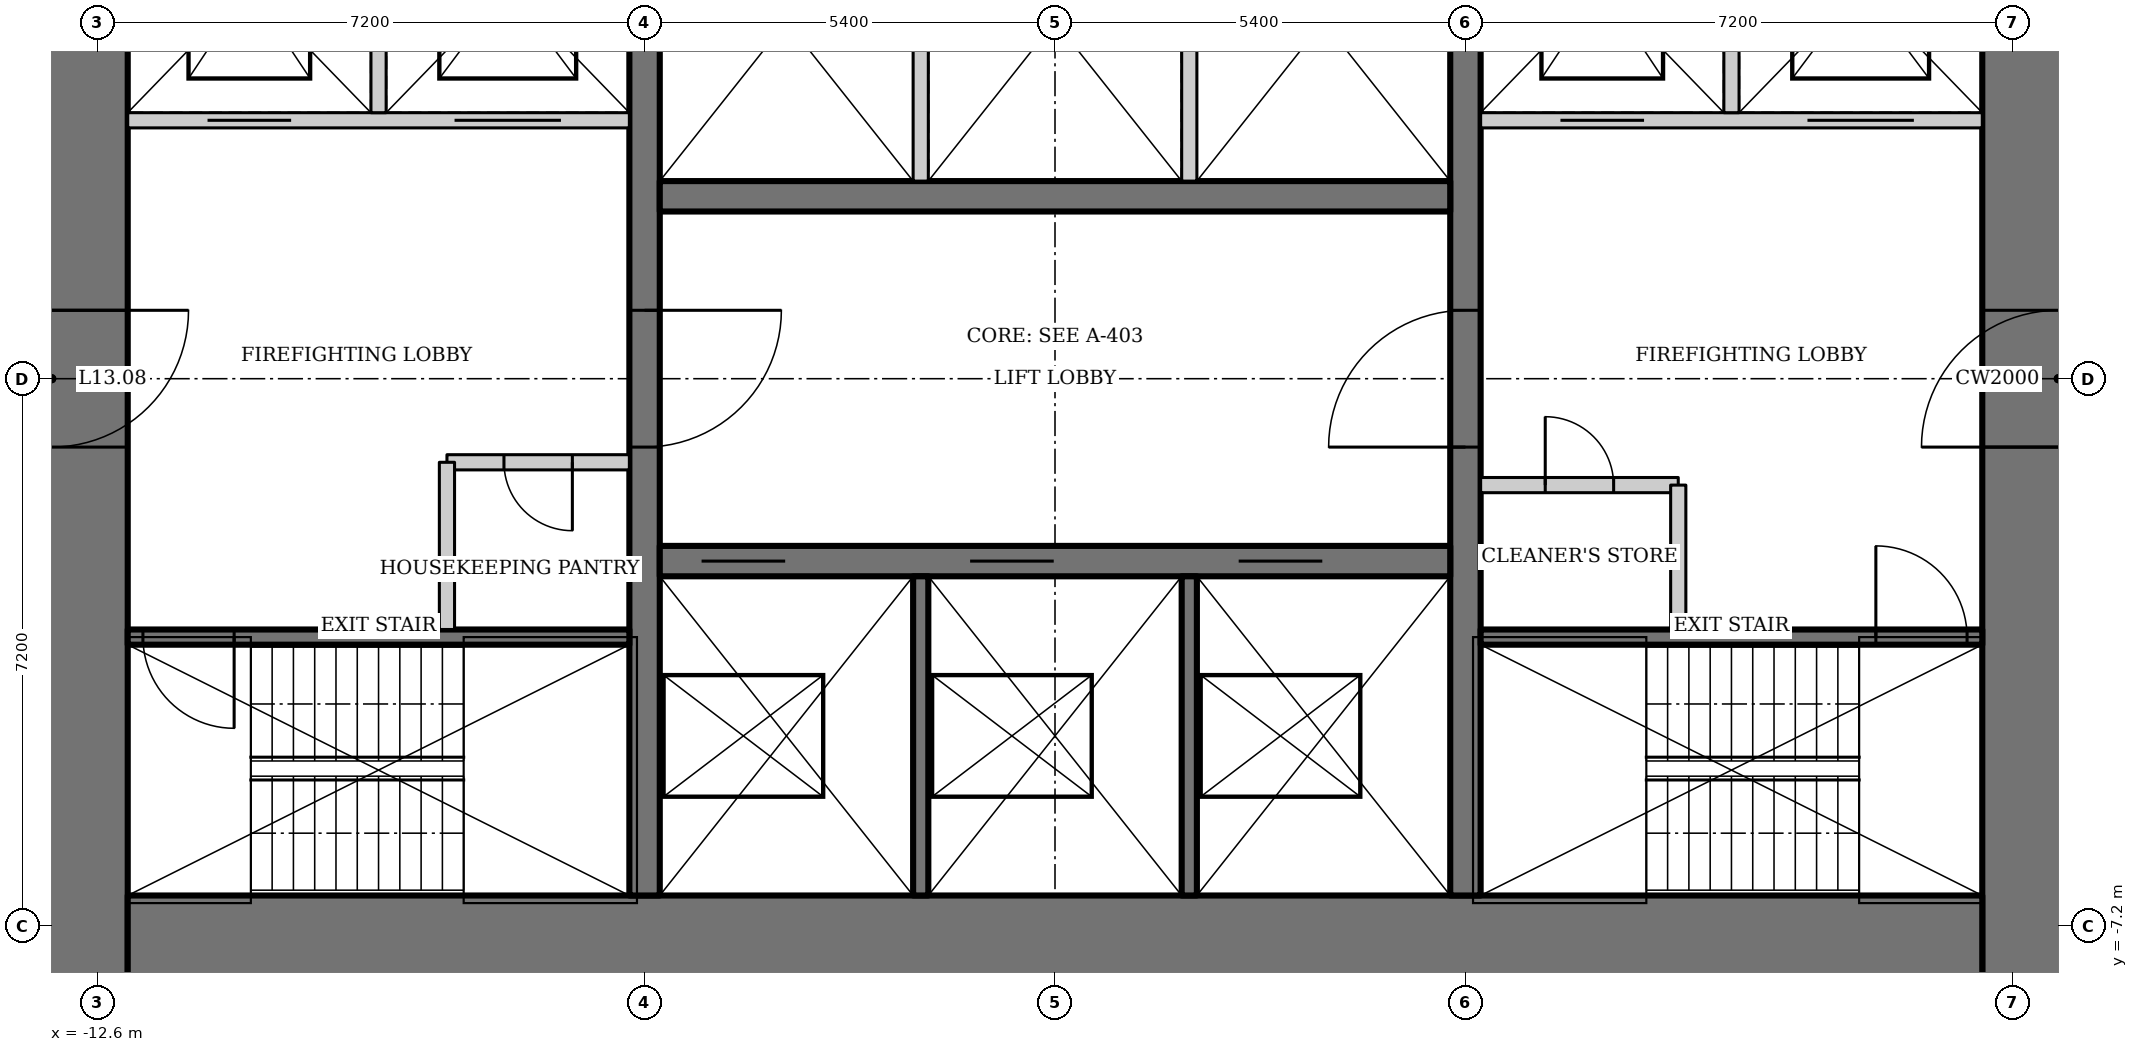
"""IFC4 building model, lengths in metres.
Left out: names, types, materials, properties, quantities, classifications, styles, units other than length and angle.
Written with IfcOpenShell. Run it as: python <this file> out.ifc"""

import sys

from ifc_helpers import new_model, si_unit, direction, frame, frame_2d, origin, place, context, subcontext, project, spatial, rectangle, extrude, element, fill, save


model = new_model("IFC4")
c1 = context("Model", 3, precision=1e-05, world=origin(), true_north=direction((0.0, 1.0)))
c2 = subcontext(c1, "Body", "Model", "MODEL_VIEW")
j1 = project(units=[si_unit("LENGTHUNIT", "METRE"), si_unit("PLANEANGLEUNIT", "RADIAN")], contexts=[c1])
p1 = place(None, origin())
s1 = spatial("IfcSite", under=j1, at=p1, CompositionType="ELEMENT")
p2 = place(p1, origin())
s2 = spatial("IfcBuilding", under=s1, at=p2, CompositionType="ELEMENT")
p3 = place(p2, frame((0.0, 0.0, 62.2)))
s3 = spatial("IfcBuildingStorey", under=s2, at=p3, CompositionType="ELEMENT", Elevation=62.2)
p4 = place(p3, frame((13.2, -13.0, 0.0), z_axis=(0.0, 0.0, 1.0), x_axis=(0.0, 1.0, 0.0)))
e1 = element("IfcWall", 1, at=p4, inside=s3, PredefinedType="SHEAR", context=c2, shape_type="SweptSolid", body=[
    extrude(rectangle(XDim=26.0, YDim=2.0, at=frame_2d((13.0, 0.0))), origin(), (0.0, 0.0, 1.0), 3.6),
])
p5 = place(p4, frame((12.1, 0.0, 0.0)))
e2 = element("IfcOpeningElement", 2, at=p5, cuts=e1, PredefinedType="OPENING", context=c2, shape_type="SweptSolid", body=[
    extrude(rectangle(XDim=1.8, YDim=2.1, at=frame_2d((0.9, 1.05))), frame((0.0, 1.01, 0.0), z_axis=(0.0, -1.0, 0.0), x_axis=(1.0, 0.0, 0.0)), (0.0, 0.0, 1.0), 2.02),
])
p6 = place(p3, frame((-13.2, 13.0, 0.0), z_axis=(0.0, 0.0, 1.0), x_axis=(0.0, -1.0, 0.0)))
e3 = element("IfcWall", 3, at=p6, inside=s3, PredefinedType="SHEAR", context=c2, shape_type="SweptSolid", body=[
    extrude(rectangle(XDim=26.0, YDim=2.0, at=frame_2d((13.0, 0.0))), origin(), (0.0, 0.0, 1.0), 3.6),
])
p7 = place(p6, frame((12.1, 0.0, 0.0)))
e4 = element("IfcOpeningElement", 4, at=p7, cuts=e3, PredefinedType="OPENING", context=c2, shape_type="SweptSolid", body=[
    extrude(rectangle(XDim=1.8, YDim=2.1, at=frame_2d((0.9, 1.05))), frame((0.0, 1.01, 0.0), z_axis=(0.0, -1.0, 0.0), x_axis=(1.0, 0.0, 0.0)), (0.0, 0.0, 1.0), 2.02),
])
p8 = place(p3, frame((-12.2, -8.0, 0.0), z_axis=(0.0, 0.0, 1.0), x_axis=(1.0, 0.0, 0.0)))
e5 = element("IfcWall", 5, at=p8, inside=s3, PredefinedType="SHEAR", context=c2, shape_type="SweptSolid", body=[
    extrude(rectangle(XDim=24.4, YDim=2.4, at=frame_2d((12.2, 0.0))), origin(), (0.0, 0.0, 1.0), 3.6),
])
p9 = place(p3, frame((5.4, -6.8, 0.0), z_axis=(0.0, 0.0, 1.0), x_axis=(0.0, 1.0, 0.0)))
e6 = element("IfcWall", 6, at=p9, inside=s3, PredefinedType="SHEAR", context=c2, shape_type="SweptSolid", body=[
    extrude(rectangle(XDim=13.6, YDim=0.4, at=frame_2d((6.8, 0.0))), origin(), (0.0, 0.0, 1.0), 3.6),
])
p10 = place(p9, frame((5.9, 0.0, 0.0)))
e7 = element("IfcOpeningElement", 7, at=p10, cuts=e6, PredefinedType="OPENING", context=c2, shape_type="SweptSolid", body=[
    extrude(rectangle(XDim=1.8, YDim=2.1, at=frame_2d((0.9, 1.05))), frame((0.0, 0.21, 0.0), z_axis=(0.0, -1.0, 0.0), x_axis=(1.0, 0.0, 0.0)), (0.0, 0.0, 1.0), 0.42),
])
p11 = place(p3, frame((-5.4, 6.8, 0.0), z_axis=(0.0, 0.0, 1.0), x_axis=(0.0, -1.0, 0.0)))
e8 = element("IfcWall", 8, at=p11, inside=s3, PredefinedType="SHEAR", context=c2, shape_type="SweptSolid", body=[
    extrude(rectangle(XDim=13.6, YDim=0.4, at=frame_2d((6.8, 0.0))), origin(), (0.0, 0.0, 1.0), 3.6),
])
p12 = place(p11, frame((5.9, 0.0, 0.0)))
e9 = element("IfcOpeningElement", 9, at=p12, cuts=e8, PredefinedType="OPENING", context=c2, shape_type="SweptSolid", body=[
    extrude(rectangle(XDim=1.8, YDim=2.1, at=frame_2d((0.9, 1.05))), frame((0.0, 0.21, 0.0), z_axis=(0.0, -1.0, 0.0), x_axis=(1.0, 0.0, 0.0)), (0.0, 0.0, 1.0), 0.42),
])
p13 = place(p3, frame((-5.2, -2.4, 0.0), z_axis=(0.0, 0.0, 1.0), x_axis=(1.0, 0.0, 0.0)))
e10 = element("IfcWall", 10, at=p13, inside=s3, PredefinedType="SHEAR", context=c2, shape_type="SweptSolid", body=[
    extrude(rectangle(XDim=10.4, YDim=0.4, at=frame_2d((5.2, 0.0))), origin(), (0.0, 0.0, 1.0), 3.6),
])
p14 = place(p13, frame((0.55, 0.0, 0.0)))
e11 = element("IfcOpeningElement", 11, at=p14, cuts=e10, PredefinedType="OPENING", context=c2, shape_type="SweptSolid", body=[
    extrude(rectangle(XDim=1.1, YDim=2.2, at=frame_2d((0.55, 1.1))), frame((0.0, 0.21, 0.0), z_axis=(0.0, -1.0, 0.0), x_axis=(1.0, 0.0, 0.0)), (0.0, 0.0, 1.0), 0.42),
])
p15 = place(p13, frame((4.083, 0.0, 0.0)))
e12 = element("IfcOpeningElement", 12, at=p15, cuts=e10, PredefinedType="OPENING", context=c2, shape_type="SweptSolid", body=[
    extrude(rectangle(XDim=1.1, YDim=2.2, at=frame_2d((0.55, 1.1))), frame((0.0, 0.21, 0.0), z_axis=(0.0, -1.0, 0.0), x_axis=(1.0, 0.0, 0.0)), (0.0, 0.0, 1.0), 0.42),
])
p16 = place(p13, frame((7.617, 0.0, 0.0)))
e13 = element("IfcOpeningElement", 13, at=p16, cuts=e10, PredefinedType="OPENING", context=c2, shape_type="SweptSolid", body=[
    extrude(rectangle(XDim=1.1, YDim=2.2, at=frame_2d((0.55, 1.1))), frame((0.0, 0.21, 0.0), z_axis=(0.0, -1.0, 0.0), x_axis=(1.0, 0.0, 0.0)), (0.0, 0.0, 1.0), 0.42),
])
for number, where, z_axis, x_axis in (
    (14, (-1.767, -2.6, 0.0), (0.0, 0.0, 1.0), (0.0, -1.0, 0.0)),
    (15, (1.767, -2.6, 0.0), (0.0, 0.0, 1.0), (0.0, -1.0, 0.0)),
):
    element("IfcWall", number, at=place(p3, frame(where, z_axis=z_axis, x_axis=x_axis)), inside=s3, PredefinedType="SOLIDWALL", context=c2, shape_type="SweptSolid", body=[
        extrude(rectangle(XDim=4.2, YDim=0.2, at=frame_2d((2.1, 0.0))), origin(), (0.0, 0.0, 1.0), 3.6),
    ])
p17 = place(p3, frame((5.2, 2.4, 0.0), z_axis=(0.0, 0.0, 1.0), x_axis=(-1.0, 0.0, 0.0)))
e16 = element("IfcWall", 16, at=p17, inside=s3, PredefinedType="SHEAR", context=c2, shape_type="SweptSolid", body=[
    extrude(rectangle(XDim=10.4, YDim=0.4, at=frame_2d((5.2, 0.0))), origin(), (0.0, 0.0, 1.0), 3.6),
])
for number, where, z_axis, x_axis in (
    (17, (-1.767, 2.6, 0.0), (0.0, 0.0, 1.0), (0.0, 1.0, 0.0)),
    (18, (1.767, 2.6, 0.0), (0.0, 0.0, 1.0), (0.0, 1.0, 0.0)),
):
    element("IfcWall", number, at=place(p3, frame(where, z_axis=z_axis, x_axis=x_axis)), inside=s3, PredefinedType="SOLIDWALL", context=c2, shape_type="SweptSolid", body=[
        extrude(rectangle(XDim=4.2, YDim=0.2, at=frame_2d((2.1, 0.0))), origin(), (0.0, 0.0, 1.0), 3.6),
    ])
p18 = place(p3, frame((5.6, -3.4, 0.0), z_axis=(0.0, 0.0, 1.0), x_axis=(1.0, 0.0, 0.0)))
e19 = element("IfcWall", 19, at=p18, inside=s3, PredefinedType="SHEAR", context=c2, shape_type="SweptSolid", body=[
    extrude(rectangle(XDim=6.6, YDim=0.2, at=frame_2d((3.3, 0.0))), origin(), (0.0, 0.0, 1.0), 3.6),
])
p19 = place(p18, frame((5.2, 0.0, 0.0)))
e20 = element("IfcOpeningElement", 20, at=p19, cuts=e19, PredefinedType="OPENING", context=c2, shape_type="SweptSolid", body=[
    extrude(rectangle(XDim=1.2, YDim=2.1, at=frame_2d((0.6, 1.05))), frame((0.0, 0.11, 0.0), z_axis=(0.0, -1.0, 0.0), x_axis=(1.0, 0.0, 0.0)), (0.0, 0.0, 1.0), 0.22),
])
p20 = place(p3, frame((12.2, 3.4, 0.0), z_axis=(0.0, 0.0, 1.0), x_axis=(-1.0, 0.0, 0.0)))
e21 = element("IfcWall", 21, at=p20, inside=s3, PredefinedType="SOLIDWALL", context=c2, shape_type="SweptSolid", body=[
    extrude(rectangle(XDim=6.6, YDim=0.2, at=frame_2d((3.3, 0.0))), origin(), (0.0, 0.0, 1.0), 3.6),
])
p21 = place(p20, frame((4.45, 0.0, 0.0)))
e22 = element("IfcOpeningElement", 22, at=p21, cuts=e21, PredefinedType="OPENING", context=c2, shape_type="SweptSolid", body=[
    extrude(rectangle(XDim=1.1, YDim=2.2, at=frame_2d((0.55, 1.1))), frame((0.0, 0.11, 0.0), z_axis=(0.0, -1.0, 0.0), x_axis=(1.0, 0.0, 0.0)), (0.0, 0.0, 1.0), 0.22),
])
p22 = place(p20, frame((0.9, 0.0, 0.0)))
e23 = element("IfcOpeningElement", 23, at=p22, cuts=e21, PredefinedType="OPENING", context=c2, shape_type="SweptSolid", body=[
    extrude(rectangle(XDim=1.4, YDim=2.2, at=frame_2d((0.7, 1.1))), frame((0.0, 0.11, 0.0), z_axis=(0.0, -1.0, 0.0), x_axis=(1.0, 0.0, 0.0)), (0.0, 0.0, 1.0), 0.22),
])
p23 = place(p3, frame((8.9, 3.5, 0.0), z_axis=(0.0, 0.0, 1.0), x_axis=(0.0, 1.0, 0.0)))
e24 = element("IfcWall", 24, at=p23, inside=s3, PredefinedType="SOLIDWALL", context=c2, shape_type="SweptSolid", body=[
    extrude(rectangle(XDim=3.3, YDim=0.2, at=frame_2d((1.65, 0.0))), origin(), (0.0, 0.0, 1.0), 3.6),
])
p24 = place(p3, frame((-5.6, -3.4, 0.0), z_axis=(0.0, 0.0, 1.0), x_axis=(-1.0, 0.0, 0.0)))
e25 = element("IfcWall", 25, at=p24, inside=s3, PredefinedType="SHEAR", context=c2, shape_type="SweptSolid", body=[
    extrude(rectangle(XDim=6.6, YDim=0.2, at=frame_2d((3.3, 0.0))), origin(), (0.0, 0.0, 1.0), 3.6),
])
p25 = place(p24, frame((5.2, 0.0, 0.0)))
e26 = element("IfcOpeningElement", 26, at=p25, cuts=e25, PredefinedType="OPENING", context=c2, shape_type="SweptSolid", body=[
    extrude(rectangle(XDim=1.2, YDim=2.1, at=frame_2d((0.6, 1.05))), frame((0.0, 0.11, 0.0), z_axis=(0.0, -1.0, 0.0), x_axis=(1.0, 0.0, 0.0)), (0.0, 0.0, 1.0), 0.22),
])
p26 = place(p3, frame((-12.2, 3.4, 0.0), z_axis=(0.0, 0.0, 1.0), x_axis=(1.0, 0.0, 0.0)))
e27 = element("IfcWall", 27, at=p26, inside=s3, PredefinedType="SOLIDWALL", context=c2, shape_type="SweptSolid", body=[
    extrude(rectangle(XDim=6.6, YDim=0.2, at=frame_2d((3.3, 0.0))), origin(), (0.0, 0.0, 1.0), 3.6),
])
p27 = place(p26, frame((1.05, 0.0, 0.0)))
e28 = element("IfcOpeningElement", 28, at=p27, cuts=e27, PredefinedType="OPENING", context=c2, shape_type="SweptSolid", body=[
    extrude(rectangle(XDim=1.1, YDim=2.2, at=frame_2d((0.55, 1.1))), frame((0.0, 0.11, 0.0), z_axis=(0.0, -1.0, 0.0), x_axis=(1.0, 0.0, 0.0)), (0.0, 0.0, 1.0), 0.22),
])
p28 = place(p26, frame((4.3, 0.0, 0.0)))
e29 = element("IfcOpeningElement", 29, at=p28, cuts=e27, PredefinedType="OPENING", context=c2, shape_type="SweptSolid", body=[
    extrude(rectangle(XDim=1.4, YDim=2.2, at=frame_2d((0.7, 1.1))), frame((0.0, 0.11, 0.0), z_axis=(0.0, -1.0, 0.0), x_axis=(1.0, 0.0, 0.0)), (0.0, 0.0, 1.0), 0.22),
])
p29 = place(p3, frame((-8.9, 3.5, 0.0), z_axis=(0.0, 0.0, 1.0), x_axis=(0.0, 1.0, 0.0)))
e30 = element("IfcWall", 30, at=p29, inside=s3, PredefinedType="SOLIDWALL", context=c2, shape_type="SweptSolid", body=[
    extrude(rectangle(XDim=3.3, YDim=0.2, at=frame_2d((1.65, 0.0))), origin(), (0.0, 0.0, 1.0), 3.6),
])
p30 = place(p3, frame((-5.6, -1.1, 0.0), z_axis=(0.0, 0.0, 1.0), x_axis=(-1.0, 0.0, 0.0)))
e31 = element("IfcWall", 31, at=p30, inside=s3, PredefinedType="SOLIDWALL", context=c2, shape_type="SweptSolid", body=[
    extrude(rectangle(XDim=2.4, YDim=0.2, at=frame_2d((1.2, 0.0))), origin(), (0.0, 0.0, 1.0), 3.45),
])
p31 = place(p30, frame((0.75, 0.0, 0.0)))
e32 = element("IfcOpeningElement", 32, at=p31, cuts=e31, PredefinedType="OPENING", context=c2, shape_type="SweptSolid", body=[
    extrude(rectangle(XDim=0.9, YDim=2.1, at=frame_2d((0.45, 1.05))), frame((0.0, 0.11, 0.0), z_axis=(0.0, -1.0, 0.0), x_axis=(1.0, 0.0, 0.0)), (0.0, 0.0, 1.0), 0.22),
])
p32 = place(p3, frame((-8.0, -1.1, 0.0), z_axis=(0.0, 0.0, 1.0), x_axis=(0.0, -1.0, 0.0)))
e33 = element("IfcWall", 33, at=p32, inside=s3, PredefinedType="SOLIDWALL", context=c2, shape_type="SweptSolid", body=[
    extrude(rectangle(XDim=2.2, YDim=0.2, at=frame_2d((1.1, 0.0))), origin(), (0.0, 0.0, 1.0), 3.45),
])
p33 = place(p3, frame((5.6, -1.4, 0.0), z_axis=(0.0, 0.0, 1.0), x_axis=(1.0, 0.0, 0.0)))
e34 = element("IfcWall", 34, at=p33, inside=s3, PredefinedType="SOLIDWALL", context=c2, shape_type="SweptSolid", body=[
    extrude(rectangle(XDim=2.6, YDim=0.2, at=frame_2d((1.3, 0.0))), origin(), (0.0, 0.0, 1.0), 3.45),
])
p34 = place(p33, frame((0.85, 0.0, 0.0)))
e35 = element("IfcOpeningElement", 35, at=p34, cuts=e34, PredefinedType="OPENING", context=c2, shape_type="SweptSolid", body=[
    extrude(rectangle(XDim=0.9, YDim=2.1, at=frame_2d((0.45, 1.05))), frame((0.0, 0.11, 0.0), z_axis=(0.0, -1.0, 0.0), x_axis=(1.0, 0.0, 0.0)), (0.0, 0.0, 1.0), 0.22),
])
p35 = place(p3, frame((8.2, -1.4, 0.0), z_axis=(0.0, 0.0, 1.0), x_axis=(0.0, -1.0, 0.0)))
e36 = element("IfcWall", 36, at=p35, inside=s3, PredefinedType="SOLIDWALL", context=c2, shape_type="SweptSolid", body=[
    extrude(rectangle(XDim=1.9, YDim=0.2, at=frame_2d((0.95, 0.0))), origin(), (0.0, 0.0, 1.0), 3.45),
])
p36 = place(p31, origin())
e37 = element("IfcDoor", 37, at=p36, inside=s3, OperationType="SINGLE_SWING_LEFT", PredefinedType="DOOR", context=c2, shape_type="SweptSolid", body=[
    extrude(rectangle(XDim=0.9, YDim=2.1, at=frame_2d((0.45, 1.05))), frame((0.0, 0.025, 0.0), z_axis=(0.0, -1.0, 0.0), x_axis=(1.0, 0.0, 0.0)), (0.0, 0.0, 1.0), 0.05),
])
fill(e32, e37)
p37 = place(p34, origin())
e38 = element("IfcDoor", 38, at=p37, inside=s3, OperationType="SINGLE_SWING_LEFT", PredefinedType="DOOR", context=c2, shape_type="SweptSolid", body=[
    extrude(rectangle(XDim=0.9, YDim=2.1, at=frame_2d((0.45, 1.05))), frame((0.0, 0.025, 0.0), z_axis=(0.0, -1.0, 0.0), x_axis=(1.0, 0.0, 0.0)), (0.0, 0.0, 1.0), 0.05),
])
fill(e35, e38)
p38 = place(p10, origin())
e39 = element("IfcDoor", 39, at=p38, inside=s3, OperationType="DOUBLE_DOOR_DOUBLE_SWING", PredefinedType="DOOR", context=c2, shape_type="SweptSolid", body=[
    extrude(rectangle(XDim=1.8, YDim=2.1, at=frame_2d((0.9, 1.05))), frame((0.0, 0.025, 0.0), z_axis=(0.0, -1.0, 0.0), x_axis=(1.0, 0.0, 0.0)), (0.0, 0.0, 1.0), 0.05),
])
fill(e7, e39)
p39 = place(p12, origin())
e40 = element("IfcDoor", 40, at=p39, inside=s3, OperationType="DOUBLE_DOOR_DOUBLE_SWING", PredefinedType="DOOR", context=c2, shape_type="SweptSolid", body=[
    extrude(rectangle(XDim=1.8, YDim=2.1, at=frame_2d((0.9, 1.05))), frame((0.0, 0.025, 0.0), z_axis=(0.0, -1.0, 0.0), x_axis=(1.0, 0.0, 0.0)), (0.0, 0.0, 1.0), 0.05),
])
fill(e9, e40)
p40 = place(p19, origin())
e41 = element("IfcDoor", 41, at=p40, inside=s3, OperationType="SINGLE_SWING_RIGHT", PredefinedType="DOOR", context=c2, shape_type="SweptSolid", body=[
    extrude(rectangle(XDim=1.2, YDim=2.1, at=frame_2d((0.6, 1.05))), frame((0.0, 0.025, 0.0), z_axis=(0.0, -1.0, 0.0), x_axis=(1.0, 0.0, 0.0)), (0.0, 0.0, 1.0), 0.05),
])
fill(e20, e41)
p41 = place(p25, origin())
e42 = element("IfcDoor", 42, at=p41, inside=s3, OperationType="SINGLE_SWING_RIGHT", PredefinedType="DOOR", context=c2, shape_type="SweptSolid", body=[
    extrude(rectangle(XDim=1.2, YDim=2.1, at=frame_2d((0.6, 1.05))), frame((0.0, 0.025, 0.0), z_axis=(0.0, -1.0, 0.0), x_axis=(1.0, 0.0, 0.0)), (0.0, 0.0, 1.0), 0.05),
])
fill(e26, e42)
p42 = place(p5, origin())
e43 = element("IfcDoor", 43, at=p42, inside=s3, OperationType="DOUBLE_DOOR_DOUBLE_SWING", PredefinedType="DOOR", context=c2, shape_type="SweptSolid", body=[
    extrude(rectangle(XDim=1.8, YDim=2.1, at=frame_2d((0.9, 1.05))), frame((0.0, 0.025, 0.0), z_axis=(0.0, -1.0, 0.0), x_axis=(1.0, 0.0, 0.0)), (0.0, 0.0, 1.0), 0.05),
])
fill(e2, e43)
p43 = place(p7, origin())
e44 = element("IfcDoor", 44, at=p43, inside=s3, OperationType="DOUBLE_DOOR_DOUBLE_SWING", PredefinedType="DOOR", context=c2, shape_type="SweptSolid", body=[
    extrude(rectangle(XDim=1.8, YDim=2.1, at=frame_2d((0.9, 1.05))), frame((0.0, 0.025, 0.0), z_axis=(0.0, -1.0, 0.0), x_axis=(1.0, 0.0, 0.0)), (0.0, 0.0, 1.0), 0.05),
])
fill(e4, e44)
p44 = place(p14, origin())
e45 = element("IfcDoor", 45, at=p44, inside=s3, OperationType="DOUBLE_DOOR_SLIDING", PredefinedType="DOOR", context=c2, shape_type="SweptSolid", body=[
    extrude(rectangle(XDim=1.1, YDim=2.2, at=frame_2d((0.55, 1.1))), frame((0.0, 0.025, 0.0), z_axis=(0.0, -1.0, 0.0), x_axis=(1.0, 0.0, 0.0)), (0.0, 0.0, 1.0), 0.05),
])
fill(e11, e45)
p45 = place(p15, origin())
e46 = element("IfcDoor", 46, at=p45, inside=s3, OperationType="DOUBLE_DOOR_SLIDING", PredefinedType="DOOR", context=c2, shape_type="SweptSolid", body=[
    extrude(rectangle(XDim=1.1, YDim=2.2, at=frame_2d((0.55, 1.1))), frame((0.0, 0.025, 0.0), z_axis=(0.0, -1.0, 0.0), x_axis=(1.0, 0.0, 0.0)), (0.0, 0.0, 1.0), 0.05),
])
fill(e12, e46)
p46 = place(p16, origin())
e47 = element("IfcDoor", 47, at=p46, inside=s3, OperationType="DOUBLE_DOOR_SLIDING", PredefinedType="DOOR", context=c2, shape_type="SweptSolid", body=[
    extrude(rectangle(XDim=1.1, YDim=2.2, at=frame_2d((0.55, 1.1))), frame((0.0, 0.025, 0.0), z_axis=(0.0, -1.0, 0.0), x_axis=(1.0, 0.0, 0.0)), (0.0, 0.0, 1.0), 0.05),
])
fill(e13, e47)
p47 = place(p27, origin())
e48 = element("IfcDoor", 48, at=p47, inside=s3, OperationType="DOUBLE_DOOR_SLIDING", PredefinedType="DOOR", context=c2, shape_type="SweptSolid", body=[
    extrude(rectangle(XDim=1.1, YDim=2.2, at=frame_2d((0.55, 1.1))), frame((0.0, 0.025, 0.0), z_axis=(0.0, -1.0, 0.0), x_axis=(1.0, 0.0, 0.0)), (0.0, 0.0, 1.0), 0.05),
])
fill(e28, e48)
p48 = place(p28, origin())
e49 = element("IfcDoor", 49, at=p48, inside=s3, OperationType="DOUBLE_DOOR_SLIDING", PredefinedType="DOOR", context=c2, shape_type="SweptSolid", body=[
    extrude(rectangle(XDim=1.4, YDim=2.2, at=frame_2d((0.7, 1.1))), frame((0.0, 0.025, 0.0), z_axis=(0.0, -1.0, 0.0), x_axis=(1.0, 0.0, 0.0)), (0.0, 0.0, 1.0), 0.05),
])
fill(e29, e49)
p49 = place(p21, origin())
e50 = element("IfcDoor", 50, at=p49, inside=s3, OperationType="DOUBLE_DOOR_SLIDING", PredefinedType="DOOR", context=c2, shape_type="SweptSolid", body=[
    extrude(rectangle(XDim=1.1, YDim=2.2, at=frame_2d((0.55, 1.1))), frame((0.0, 0.025, 0.0), z_axis=(0.0, -1.0, 0.0), x_axis=(1.0, 0.0, 0.0)), (0.0, 0.0, 1.0), 0.05),
])
fill(e22, e50)
p50 = place(p22, origin())
e51 = element("IfcDoor", 51, at=p50, inside=s3, OperationType="DOUBLE_DOOR_SLIDING", PredefinedType="DOOR", context=c2, shape_type="SweptSolid", body=[
    extrude(rectangle(XDim=1.4, YDim=2.2, at=frame_2d((0.7, 1.1))), frame((0.0, 0.025, 0.0), z_axis=(0.0, -1.0, 0.0), x_axis=(1.0, 0.0, 0.0)), (0.0, 0.0, 1.0), 0.05),
])
fill(e23, e51)
save(model, sys.argv[1])
